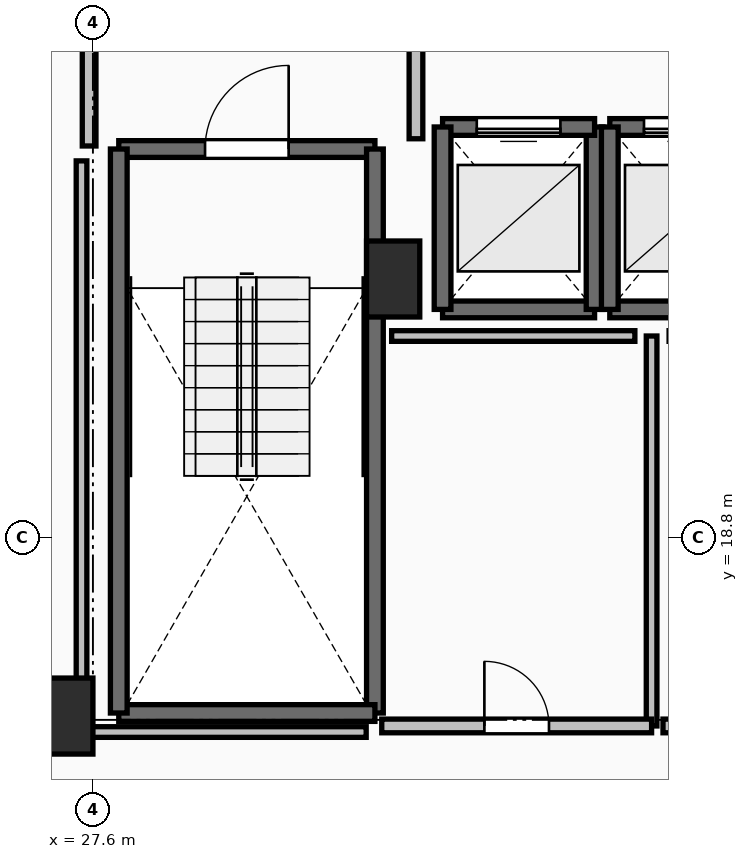
"""IFC4 building model, lengths in metres.
Left out: names, types, materials, properties, quantities, classifications, styles, units other than length and angle.
Written with IfcOpenShell. Run it as: python <this file> out.ifc"""

import sys

from ifc_helpers import new_model, si_unit, direction, frame, frame_2d, origin, origin_2d, place, context, subcontext, project, spatial, rectangle, extrude, element, fill, save


model = new_model("IFC4")
c1 = context("Model", 3, precision=1e-05, world=origin(), true_north=direction((0.0, 1.0)))
c2 = subcontext(c1, "Body", "Model", "MODEL_VIEW")
j1 = project(units=[si_unit("LENGTHUNIT", "METRE"), si_unit("PLANEANGLEUNIT", "RADIAN")], contexts=[c1])
p1 = place(None, origin())
s1 = spatial("IfcSite", under=j1, at=p1, CompositionType="ELEMENT")
p2 = place(p1, origin())
s2 = spatial("IfcBuilding", under=s1, at=p2, CompositionType="ELEMENT")
p3 = place(p2, frame((0.0, 0.0, 186.1)))
s3 = spatial("IfcBuildingStorey", under=s2, at=p3, CompositionType="ELEMENT", Elevation=186.1)
for number, where, z_axis, x_axis in (
    (1, (27.25, 16.45, 0.0), (0.0, 0.0, 1.0), (1.0, 0.0, 0.0)),
    (2, (31.55, 22.2, 0.0), (0.0, 0.0, 1.0), (1.0, 0.0, 0.0)),
):
    element("IfcColumn", number, at=place(p3, frame(where, z_axis=z_axis, x_axis=x_axis)), inside=s3, PredefinedType="PILASTER", context=c2, shape_type="SweptSolid", body=[
        extrude(rectangle(XDim=0.7, YDim=1.0, at=origin_2d()), origin(), (0.0, 0.0, 1.0), 3.5),
    ])
p4 = place(p3, frame((27.94, 23.91, 0.0), z_axis=(0.0, 0.0, 1.0), x_axis=(1.0, 0.0, 0.0)))
e3 = element("IfcWall", 3, at=p4, inside=s3, PredefinedType="SOLIDWALL", context=c2, shape_type="SweptSolid", body=[
    extrude(rectangle(XDim=3.37, YDim=0.22, at=frame_2d((1.685, 0.0))), origin(), (0.0, 0.0, 1.0), 3.24),
])
p5 = place(p4, frame((1.135, 0.0, 0.0)))
e4 = element("IfcOpeningElement", 4, at=p5, cuts=e3, PredefinedType="OPENING", context=c2, shape_type="SweptSolid", body=[
    extrude(rectangle(XDim=1.1, YDim=2.15, at=frame_2d((0.55, 1.075))), frame((0.0, 0.125, 0.0), z_axis=(0.0, -1.0, 0.0), x_axis=(1.0, 0.0, 0.0)), (0.0, 0.0, 1.0), 0.25),
])
p6 = place(p3, frame((31.31, 23.91, 0.0), z_axis=(0.0, 0.0, 1.0), x_axis=(0.0, -1.0, 0.0)))
e5 = element("IfcWall", 5, at=p6, inside=s3, PredefinedType="SOLIDWALL", context=c2, shape_type="SweptSolid", body=[
    extrude(rectangle(XDim=7.42, YDim=0.22, at=frame_2d((3.71, 0.0))), origin(), (0.0, 0.0, 1.0), 3.24),
])
p7 = place(p3, frame((31.31, 16.49, 0.0), z_axis=(0.0, 0.0, 1.0), x_axis=(-1.0, 0.0, 0.0)))
e6 = element("IfcWall", 6, at=p7, inside=s3, PredefinedType="SOLIDWALL", context=c2, shape_type="SweptSolid", body=[
    extrude(rectangle(XDim=3.37, YDim=0.22, at=frame_2d((1.685, 0.0))), origin(), (0.0, 0.0, 1.0), 3.24),
])
p8 = place(p3, frame((27.94, 16.49, 0.0), z_axis=(0.0, 0.0, 1.0), x_axis=(0.0, 1.0, 0.0)))
e7 = element("IfcWall", 7, at=p8, inside=s3, PredefinedType="SOLIDWALL", context=c2, shape_type="SweptSolid", body=[
    extrude(rectangle(XDim=7.42, YDim=0.22, at=frame_2d((3.71, 0.0))), origin(), (0.0, 0.0, 1.0), 3.24),
])
p9 = place(p3, frame((32.2, 21.8, 0.0), z_axis=(0.0, 0.0, 1.0), x_axis=(1.0, 0.0, 0.0)))
e8 = element("IfcWall", 8, at=p9, inside=s3, PredefinedType="SOLIDWALL", context=c2, shape_type="SweptSolid", body=[
    extrude(rectangle(XDim=2.0, YDim=0.22, at=frame_2d((1.0, 0.0))), origin(), (0.0, 0.0, 1.0), 3.24),
])
p10 = place(p3, frame((34.2, 21.8, 0.0), z_axis=(0.0, 0.0, 1.0), x_axis=(0.0, 1.0, 0.0)))
e9 = element("IfcWall", 9, at=p10, inside=s3, PredefinedType="SOLIDWALL", context=c2, shape_type="SweptSolid", body=[
    extrude(rectangle(XDim=2.4, YDim=0.22, at=frame_2d((1.2, 0.0))), origin(), (0.0, 0.0, 1.0), 3.24),
])
p11 = place(p3, frame((34.2, 24.2, 0.0), z_axis=(0.0, 0.0, 1.0), x_axis=(-1.0, 0.0, 0.0)))
e10 = element("IfcWall", 10, at=p11, inside=s3, PredefinedType="SOLIDWALL", context=c2, shape_type="SweptSolid", body=[
    extrude(rectangle(XDim=2.0, YDim=0.22, at=frame_2d((1.0, 0.0))), origin(), (0.0, 0.0, 1.0), 3.24),
])
p12 = place(p11, frame((0.45, 0.0, 0.0)))
e11 = element("IfcOpeningElement", 11, at=p12, cuts=e10, PredefinedType="OPENING", context=c2, shape_type="SweptSolid", body=[
    extrude(rectangle(XDim=1.1, YDim=2.2, at=frame_2d((0.55, 1.1))), frame((0.0, 0.125, 0.0), z_axis=(0.0, -1.0, 0.0), x_axis=(1.0, 0.0, 0.0)), (0.0, 0.0, 1.0), 0.25),
])
p13 = place(p3, frame((32.2, 24.2, 0.0), z_axis=(0.0, 0.0, 1.0), x_axis=(0.0, -1.0, 0.0)))
e12 = element("IfcWall", 12, at=p13, inside=s3, PredefinedType="SOLIDWALL", context=c2, shape_type="SweptSolid", body=[
    extrude(rectangle(XDim=2.4, YDim=0.22, at=frame_2d((1.2, 0.0))), origin(), (0.0, 0.0, 1.0), 3.24),
])
p14 = place(p3, frame((34.4, 21.8, 0.0), z_axis=(0.0, 0.0, 1.0), x_axis=(1.0, 0.0, 0.0)))
e13 = element("IfcWall", 13, at=p14, inside=s3, PredefinedType="SOLIDWALL", context=c2, shape_type="SweptSolid", body=[
    extrude(rectangle(XDim=2.0, YDim=0.22, at=frame_2d((1.0, 0.0))), origin(), (0.0, 0.0, 1.0), 3.24),
])
p15 = place(p3, frame((36.4, 24.2, 0.0), z_axis=(0.0, 0.0, 1.0), x_axis=(-1.0, 0.0, 0.0)))
e14 = element("IfcWall", 14, at=p15, inside=s3, PredefinedType="SOLIDWALL", context=c2, shape_type="SweptSolid", body=[
    extrude(rectangle(XDim=2.0, YDim=0.22, at=frame_2d((1.0, 0.0))), origin(), (0.0, 0.0, 1.0), 3.24),
])
p16 = place(p15, frame((0.45, 0.0, 0.0)))
e15 = element("IfcOpeningElement", 15, at=p16, cuts=e14, PredefinedType="OPENING", context=c2, shape_type="SweptSolid", body=[
    extrude(rectangle(XDim=1.1, YDim=2.2, at=frame_2d((0.55, 1.1))), frame((0.0, 0.125, 0.0), z_axis=(0.0, -1.0, 0.0), x_axis=(1.0, 0.0, 0.0)), (0.0, 0.0, 1.0), 0.25),
])
p17 = place(p3, frame((34.4, 24.2, 0.0), z_axis=(0.0, 0.0, 1.0), x_axis=(0.0, -1.0, 0.0)))
e16 = element("IfcWall", 16, at=p17, inside=s3, PredefinedType="SOLIDWALL", context=c2, shape_type="SweptSolid", body=[
    extrude(rectangle(XDim=2.4, YDim=0.22, at=frame_2d((1.2, 0.0))), origin(), (0.0, 0.0, 1.0), 3.24),
])
p18 = place(p3, frame((31.85, 24.045, 0.0), z_axis=(0.0, 0.0, 1.0), x_axis=(0.0, 1.0, 0.0)))
e17 = element("IfcWall", 17, at=p18, inside=s3, PredefinedType="PARTITIONING", context=c2, shape_type="SweptSolid", body=[
    extrude(rectangle(XDim=3.91, YDim=0.18, at=frame_2d((1.955, 0.0))), origin(), (0.0, 0.0, 1.0), 3.24),
])
p19 = place(p18, frame((1.355, 0.0, 0.0)))
e18 = element("IfcOpeningElement", 18, at=p19, cuts=e17, PredefinedType="OPENING", context=c2, shape_type="SweptSolid", body=[
    extrude(rectangle(XDim=1.2, YDim=2.15, at=frame_2d((0.6, 1.075))), frame((0.0, 0.105, 0.0), z_axis=(0.0, -1.0, 0.0), x_axis=(1.0, 0.0, 0.0)), (0.0, 0.0, 1.0), 0.21),
])
p20 = place(p3, frame((27.55, 28.0, 0.0), z_axis=(0.0, 0.0, 1.0), x_axis=(0.0, -1.0, 0.0)))
e19 = element("IfcWall", 19, at=p20, inside=s3, PredefinedType="PARTITIONING", context=c2, shape_type="SweptSolid", body=[
    extrude(rectangle(XDim=4.05, YDim=0.18, at=frame_2d((2.025, 0.0))), origin(), (0.0, 0.0, 1.0), 3.24),
])
p21 = place(p20, frame((1.425, 0.0, 0.0)))
e20 = element("IfcOpeningElement", 20, at=p21, cuts=e19, PredefinedType="OPENING", context=c2, shape_type="SweptSolid", body=[
    extrude(rectangle(XDim=1.2, YDim=2.15, at=frame_2d((0.6, 1.075))), frame((0.0, 0.105, 0.0), z_axis=(0.0, -1.0, 0.0), x_axis=(1.0, 0.0, 0.0)), (0.0, 0.0, 1.0), 0.21),
])
p22 = place(p3, frame((34.95, 16.32, 0.0), z_axis=(0.0, 0.0, 1.0), x_axis=(0.0, 1.0, 0.0)))
e21 = element("IfcWall", 21, at=p22, inside=s3, PredefinedType="PARTITIONING", context=c2, shape_type="SweptSolid", body=[
    extrude(rectangle(XDim=5.13, YDim=0.14, at=frame_2d((2.565, 0.0))), origin(), (0.0, 0.0, 1.0), 3.24),
])
p23 = place(p3, frame((31.4, 16.32, 0.0), z_axis=(0.0, 0.0, 1.0), x_axis=(1.0, 0.0, 0.0)))
e22 = element("IfcWall", 22, at=p23, inside=s3, PredefinedType="PARTITIONING", context=c2, shape_type="SweptSolid", body=[
    extrude(rectangle(XDim=3.55, YDim=0.18, at=frame_2d((1.775, 0.0))), origin(), (0.0, 0.0, 1.0), 3.24),
])
p24 = place(p23, frame((1.35, 0.0, 0.0)))
e23 = element("IfcOpeningElement", 23, at=p24, cuts=e22, PredefinedType="OPENING", context=c2, shape_type="SweptSolid", body=[
    extrude(rectangle(XDim=0.85, YDim=2.1, at=frame_2d((0.425, 1.05))), frame((0.0, 0.105, 0.0), z_axis=(0.0, -1.0, 0.0), x_axis=(1.0, 0.0, 0.0)), (0.0, 0.0, 1.0), 0.21),
])
p25 = place(p3, frame((35.1, 16.32, 0.0), z_axis=(0.0, 0.0, 1.0), x_axis=(1.0, 0.0, 0.0)))
e24 = element("IfcWall", 24, at=p25, inside=s3, PredefinedType="PARTITIONING", context=c2, shape_type="SweptSolid", body=[
    extrude(rectangle(XDim=3.7, YDim=0.18, at=frame_2d((1.85, 0.0))), origin(), (0.0, 0.0, 1.0), 3.24),
])
p26 = place(p25, frame((1.35, 0.0, 0.0)))
e25 = element("IfcOpeningElement", 25, at=p26, cuts=e24, PredefinedType="OPENING", context=c2, shape_type="SweptSolid", body=[
    extrude(rectangle(XDim=1.0, YDim=2.15, at=frame_2d((0.5, 1.075))), frame((0.0, 0.105, 0.0), z_axis=(0.0, -1.0, 0.0), x_axis=(1.0, 0.0, 0.0)), (0.0, 0.0, 1.0), 0.21),
])
p27 = place(p3, frame((34.73, 21.45, 0.0), z_axis=(0.0, 0.0, 1.0), x_axis=(-1.0, 0.0, 0.0)))
e26 = element("IfcWall", 26, at=p27, inside=s3, PredefinedType="PARTITIONING", context=c2, shape_type="SweptSolid", body=[
    extrude(rectangle(XDim=3.2, YDim=0.14, at=frame_2d((1.6, 0.0))), origin(), (0.0, 0.0, 1.0), 3.24),
])
p28 = place(p3, frame((27.45, 23.754, 0.0), z_axis=(0.0, 0.0, 1.0), x_axis=(0.0, -1.0, 0.0)))
e27 = element("IfcWall", 27, at=p28, inside=s3, PredefinedType="PARTITIONING", context=c2, shape_type="SweptSolid", body=[
    extrude(rectangle(XDim=7.514, YDim=0.14, at=frame_2d((3.757, 0.0))), origin(), (0.0, 0.0, 1.0), 2.432),
])
p29 = place(p3, frame((27.45, 16.24, 0.0), z_axis=(0.0, 0.0, 1.0), x_axis=(1.0, 0.0, 0.0)))
e28 = element("IfcWall", 28, at=p29, inside=s3, PredefinedType="PARTITIONING", context=c2, shape_type="SweptSolid", body=[
    extrude(rectangle(XDim=3.745, YDim=0.14, at=frame_2d((1.873, 0.0))), origin(), (0.0, 0.0, 1.0), 2.432),
])
p30 = place(p5, origin())
e29 = element("IfcDoor", 29, at=p30, inside=s3, OperationType="SINGLE_SWING_RIGHT", PredefinedType="DOOR", context=c2, shape_type="SweptSolid", body=[
    extrude(rectangle(XDim=1.1, YDim=2.15, at=frame_2d((0.55, 1.075))), frame((0.0, 0.025, 0.0), z_axis=(0.0, -1.0, 0.0), x_axis=(1.0, 0.0, 0.0)), (0.0, 0.0, 1.0), 0.05),
])
fill(e4, e29)
p31 = place(p12, origin())
e30 = element("IfcDoor", 30, at=p31, inside=s3, OperationType="SLIDING_TO_LEFT", PredefinedType="DOOR", context=c2, shape_type="SweptSolid", body=[
    extrude(rectangle(XDim=1.1, YDim=2.2, at=frame_2d((0.55, 1.1))), frame((0.0, 0.025, 0.0), z_axis=(0.0, -1.0, 0.0), x_axis=(1.0, 0.0, 0.0)), (0.0, 0.0, 1.0), 0.05),
])
fill(e11, e30)
p32 = place(p16, origin())
e31 = element("IfcDoor", 31, at=p32, inside=s3, OperationType="SLIDING_TO_LEFT", PredefinedType="DOOR", context=c2, shape_type="SweptSolid", body=[
    extrude(rectangle(XDim=1.1, YDim=2.2, at=frame_2d((0.55, 1.1))), frame((0.0, 0.025, 0.0), z_axis=(0.0, -1.0, 0.0), x_axis=(1.0, 0.0, 0.0)), (0.0, 0.0, 1.0), 0.05),
])
fill(e15, e31)
p33 = place(p24, origin())
e32 = element("IfcDoor", 32, at=p33, inside=s3, OperationType="SINGLE_SWING_LEFT", PredefinedType="DOOR", context=c2, shape_type="SweptSolid", body=[
    extrude(rectangle(XDim=0.85, YDim=2.1, at=frame_2d((0.425, 1.05))), frame((0.0, 0.025, 0.0), z_axis=(0.0, -1.0, 0.0), x_axis=(1.0, 0.0, 0.0)), (0.0, 0.0, 1.0), 0.05),
])
fill(e23, e32)
save(model, sys.argv[1])
